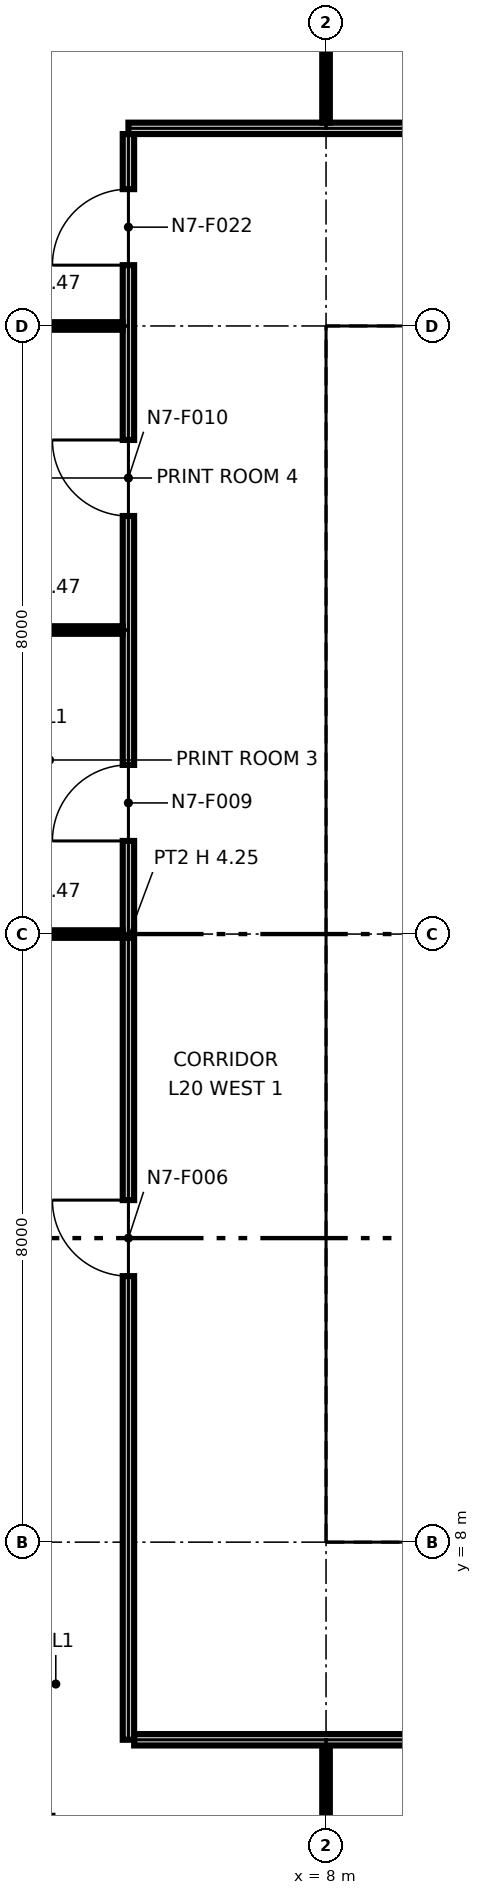
"""IFC4 building model, lengths in metres.
Left out: names, types, materials, properties, quantities, classifications, styles, units other than length and angle.
Written with IfcOpenShell. Run it as: python <this file> out.ifc"""

import sys

from ifc_helpers import new_model, si_unit, direction, frame, frame_2d, origin, origin_2d, place, context, subcontext, project, spatial, polyline, rectangle, i_section, outline, extrude, element, fill, save


model = new_model("IFC4")
c1 = context("Model", 3, precision=1e-05, world=origin(), true_north=direction((0.0, 1.0)))
c2 = subcontext(c1, "Body", "Model", "MODEL_VIEW")
j1 = project(units=[si_unit("LENGTHUNIT", "METRE"), si_unit("PLANEANGLEUNIT", "RADIAN")], contexts=[c1])
p1 = place(None, origin())
s1 = spatial("IfcSite", under=j1, at=p1, CompositionType="ELEMENT")
p2 = place(p1, origin())
s2 = spatial("IfcBuilding", under=s1, at=p2, CompositionType="ELEMENT")
p3 = place(p2, frame((0.0, 0.0, 105.2)))
s3 = spatial("IfcBuildingStorey", under=s2, at=p3, CompositionType="ELEMENT", Elevation=105.2)
for number, where, z_axis, x_axis in (
    (1, (8.0, 8.0, 0.0), (0.0, 0.0, 1.0), (1.0, 0.0, 0.0)),
    (2, (8.0, 16.0, 0.0), (0.0, 0.0, 1.0), (1.0, 0.0, 0.0)),
):
    element("IfcColumn", number, at=place(p3, frame(where, z_axis=z_axis, x_axis=x_axis)), inside=s3, PredefinedType="COLUMN", context=c2, shape_type="SweptSolid", body=[
        extrude(i_section(OverallWidth=0.406, OverallDepth=0.417, WebThickness=0.03, FlangeThickness=0.048, at=origin_2d()), origin(), (0.0, 0.0, 1.0), 4.25),
    ])
p4 = place(p3, frame((8.0, 24.0, 0.0), z_axis=(0.0, 0.0, 1.0), x_axis=(1.0, 0.0, 0.0)))
e3 = element("IfcColumn", 3, at=p4, inside=s3, PredefinedType="COLUMN", context=c2, shape_type="SweptSolid", body=[
    extrude(i_section(OverallWidth=0.411, OverallDepth=0.434, WebThickness=0.036, FlangeThickness=0.057, at=origin_2d()), origin(), (0.0, 0.0, 1.0), 4.25),
])
p5 = place(p3, frame((8.65, 8.75, 0.0), z_axis=(0.0, 0.0, 1.0), x_axis=(1.0, 0.0, 0.0)))
e4 = element("IfcWall", 4, at=p5, inside=s3, PredefinedType="PARTITIONING", context=c2, shape_type="SweptSolid", body=[
    extrude(outline(polyline([(0.0, 0.0), (14.7, 0.0), (14.7, 4.25), (7.469, 4.25), (7.469, 3.632), (7.231, 3.632), (7.23, 4.25), (0.0, 4.25), (0.0, 0.0)])), frame((0.0, 0.1, 0.0), z_axis=(0.0, -1.0, 0.0), x_axis=(1.0, 0.0, 0.0)), (0.0, 0.0, 1.0), 0.2),
])
p6 = place(p5, frame((1.3, 0.0, 0.0)))
e5 = element("IfcOpeningElement", 5, at=p6, cuts=e4, PredefinedType="OPENING", context=c2, shape_type="SweptSolid", body=[
    extrude(rectangle(XDim=1.4, YDim=2.1, at=frame_2d((0.7, 1.05))), frame((0.0, 0.11, 0.0), z_axis=(0.0, -1.0, 0.0), x_axis=(1.0, 0.0, 0.0)), (0.0, 0.0, 1.0), 0.22),
])
p7 = place(p5, frame((4.6, 0.0, 0.0)))
e6 = element("IfcOpeningElement", 6, at=p7, cuts=e4, PredefinedType="OPENING", context=c2, shape_type="SweptSolid", body=[
    extrude(rectangle(XDim=1.4, YDim=2.1, at=frame_2d((0.7, 1.05))), frame((0.0, 0.11, 0.0), z_axis=(0.0, -1.0, 0.0), x_axis=(1.0, 0.0, 0.0)), (0.0, 0.0, 1.0), 0.22),
])
p8 = place(p5, frame((10.4, 0.0, 0.0)))
e7 = element("IfcOpeningElement", 7, at=p8, cuts=e4, PredefinedType="OPENING", context=c2, shape_type="SweptSolid", body=[
    extrude(rectangle(XDim=1.2, YDim=2.1, at=frame_2d((0.6, 1.05))), frame((0.0, 0.11, 0.0), z_axis=(0.0, -1.0, 0.0), x_axis=(1.0, 0.0, 0.0)), (0.0, 0.0, 1.0), 0.22),
])
p9 = place(p3, frame((8.75, 8.85, 0.0), z_axis=(0.0, 0.0, 1.0), x_axis=(0.0, 1.0, 0.0)))
e8 = element("IfcWall", 8, at=p9, inside=s3, PredefinedType="PARTITIONING", context=c2, shape_type="SweptSolid", body=[
    extrude(outline(polyline([(0.0, 0.0), (14.3, 0.0), (14.3, 4.25), (10.231, 4.25), (10.23, 3.789), (10.07, 3.789), (10.069, 4.25), (7.27, 4.25), (7.269, 3.632), (7.031, 3.632), (7.031, 4.25), (0.0, 4.25), (0.0, 0.0)])), frame((0.0, 0.1, 0.0), z_axis=(0.0, -1.0, 0.0), x_axis=(1.0, 0.0, 0.0)), (0.0, 0.0, 1.0), 0.2),
])
p10 = place(p9, frame((8.3, 0.0, 0.0)))
e9 = element("IfcOpeningElement", 9, at=p10, cuts=e8, PredefinedType="OPENING", context=c2, shape_type="SweptSolid", body=[
    extrude(rectangle(XDim=1.8, YDim=2.1, at=frame_2d((0.9, 1.05))), frame((0.0, 0.11, 0.0), z_axis=(0.0, -1.0, 0.0), x_axis=(1.0, 0.0, 0.0)), (0.0, 0.0, 1.0), 0.22),
])
p11 = place(p3, frame((8.65, 23.25, 0.0), z_axis=(0.0, 0.0, 1.0), x_axis=(1.0, 0.0, 0.0)))
e10 = element("IfcWall", 10, at=p11, inside=s3, PredefinedType="PARTITIONING", context=c2, shape_type="SweptSolid", body=[
    extrude(outline(polyline([(0.0, 0.0), (14.7, 0.0), (14.7, 4.25), (7.469, 4.25), (7.469, 3.632), (7.231, 3.632), (7.23, 4.25), (0.0, 4.25), (0.0, 0.0)])), frame((0.0, 0.1, 0.0), z_axis=(0.0, -1.0, 0.0), x_axis=(1.0, 0.0, 0.0)), (0.0, 0.0, 1.0), 0.2),
])
p12 = place(p3, frame((8.85, 16.0, 0.0), z_axis=(0.0, 0.0, 1.0), x_axis=(1.0, 0.0, 0.0)))
e11 = element("IfcWall", 11, at=p12, inside=s3, PredefinedType="PARTITIONING", context=c2, shape_type="SweptSolid", body=[
    extrude(rectangle(XDim=6.931, YDim=0.6, at=frame_2d((3.466, 0.0))), origin(), (0.0, 0.0, 1.0), 3.632),
])
p13 = place(p3, frame((8.85, 19.9, 0.0), z_axis=(0.0, 0.0, 1.0), x_axis=(1.0, 0.0, 0.0)))
e12 = element("IfcWall", 12, at=p13, inside=s3, PredefinedType="PARTITIONING", context=c2, shape_type="SweptSolid", body=[
    extrude(outline(polyline([(0.0, 0.0), (14.3, 0.0), (14.3, 3.789), (7.27, 3.789), (7.269, 3.632), (7.031, 3.632), (7.031, 4.25), (0.0, 4.25), (0.0, 0.0)])), frame((0.0, 0.1, 0.0), z_axis=(0.0, -1.0, 0.0), x_axis=(1.0, 0.0, 0.0)), (0.0, 0.0, 1.0), 0.2),
])
p14 = place(p13, frame((6.9, 0.0, 0.0)))
e13 = element("IfcOpeningElement", 13, at=p14, cuts=e12, PredefinedType="OPENING", context=c2, shape_type="SweptSolid", body=[
    extrude(rectangle(XDim=0.9, YDim=2.1, at=frame_2d((0.45, 1.05))), frame((0.0, 0.11, 0.0), z_axis=(0.0, -1.0, 0.0), x_axis=(1.0, 0.0, 0.0)), (0.0, 0.0, 1.0), 0.22),
])
p15 = place(p13, frame((9.95, 0.0, 0.0)))
e14 = element("IfcOpeningElement", 14, at=p15, cuts=e12, PredefinedType="OPENING", context=c2, shape_type="SweptSolid", body=[
    extrude(rectangle(XDim=0.9, YDim=2.1, at=frame_2d((0.45, 1.05))), frame((0.0, 0.11, 0.0), z_axis=(0.0, -1.0, 0.0), x_axis=(1.0, 0.0, 0.0)), (0.0, 0.0, 1.0), 0.22),
])
p16 = place(p13, frame((12.45, 0.0, 0.0)))
e15 = element("IfcOpeningElement", 15, at=p16, cuts=e12, PredefinedType="OPENING", context=c2, shape_type="SweptSolid", body=[
    extrude(rectangle(XDim=0.9, YDim=2.1, at=frame_2d((0.45, 1.05))), frame((0.0, 0.11, 0.0), z_axis=(0.0, -1.0, 0.0), x_axis=(1.0, 0.0, 0.0)), (0.0, 0.0, 1.0), 0.22),
])
p17 = place(p3, frame((8.0, 2.83, 0.0), z_axis=(0.0, 0.0, 1.0), x_axis=(0.0, 1.0, 0.0)))
e16 = element("IfcWall", 16, at=p17, inside=s3, PredefinedType="PARTITIONING", context=c2, shape_type="SweptSolid", body=[
    extrude(rectangle(XDim=2.495, YDim=0.1, at=frame_2d((1.248, 0.0))), origin(), (0.0, 0.0, 1.0), 3.47),
])
p18 = place(p3, frame((5.475, 5.4, 0.0), z_axis=(0.0, 0.0, 1.0), x_axis=(1.0, 0.0, 0.0)))
e17 = element("IfcWall", 17, at=p18, inside=s3, PredefinedType="PARTITIONING", context=c2, shape_type="SweptSolid", body=[
    extrude(rectangle(XDim=21.05, YDim=0.15, at=frame_2d((10.525, 0.0))), origin(), (0.0, 0.0, 1.0), 4.25),
])
p19 = place(p18, frame((13.025, 0.0, 0.0), z_axis=(0.0, 0.0, 1.0), x_axis=(-1.0, 0.0, 0.0)))
e18 = element("IfcOpeningElement", 18, at=p19, cuts=e17, PredefinedType="OPENING", context=c2, shape_type="SweptSolid", body=[
    extrude(rectangle(XDim=1.0, YDim=2.1, at=frame_2d((0.5, 1.05))), frame((0.0, 0.085, 0.0), z_axis=(0.0, -1.0, 0.0), x_axis=(1.0, 0.0, 0.0)), (0.0, 0.0, 1.0), 0.17),
])
p20 = place(p18, frame((17.025, 0.0, 0.0), z_axis=(0.0, 0.0, 1.0), x_axis=(-1.0, 0.0, 0.0)))
e19 = element("IfcOpeningElement", 19, at=p20, cuts=e17, PredefinedType="OPENING", context=c2, shape_type="SweptSolid", body=[
    extrude(rectangle(XDim=1.0, YDim=2.1, at=frame_2d((0.5, 1.05))), frame((0.0, 0.085, 0.0), z_axis=(0.0, -1.0, 0.0), x_axis=(1.0, 0.0, 0.0)), (0.0, 0.0, 1.0), 0.17),
])
p21 = place(p18, frame((5.025, 0.0, 0.0), z_axis=(0.0, 0.0, 1.0), x_axis=(-1.0, 0.0, 0.0)))
e20 = element("IfcOpeningElement", 20, at=p21, cuts=e17, PredefinedType="OPENING", context=c2, shape_type="SweptSolid", body=[
    extrude(rectangle(XDim=1.0, YDim=2.1, at=frame_2d((0.5, 1.05))), frame((0.0, 0.085, 0.0), z_axis=(0.0, -1.0, 0.0), x_axis=(1.0, 0.0, 0.0)), (0.0, 0.0, 1.0), 0.17),
])
p22 = place(p18, frame((9.025, 0.0, 0.0), z_axis=(0.0, 0.0, 1.0), x_axis=(-1.0, 0.0, 0.0)))
e21 = element("IfcOpeningElement", 21, at=p22, cuts=e17, PredefinedType="OPENING", context=c2, shape_type="SweptSolid", body=[
    extrude(rectangle(XDim=1.0, YDim=2.1, at=frame_2d((0.5, 1.05))), frame((0.0, 0.085, 0.0), z_axis=(0.0, -1.0, 0.0), x_axis=(1.0, 0.0, 0.0)), (0.0, 0.0, 1.0), 0.17),
])
p23 = place(p18, frame((18.925, 0.0, 0.0)))
e22 = element("IfcOpeningElement", 22, at=p23, cuts=e17, PredefinedType="OPENING", context=c2, shape_type="SweptSolid", body=[
    extrude(rectangle(XDim=1.8, YDim=2.1, at=frame_2d((0.9, 1.05))), frame((0.0, 0.085, 0.0), z_axis=(0.0, -1.0, 0.0), x_axis=(1.0, 0.0, 0.0)), (0.0, 0.0, 1.0), 0.17),
])
p24 = place(p3, frame((5.4, 5.4, 0.0), z_axis=(0.0, 0.0, 1.0), x_axis=(0.0, 1.0, 0.0)))
e23 = element("IfcWall", 23, at=p24, inside=s3, PredefinedType="PARTITIONING", context=c2, shape_type="SweptSolid", body=[
    extrude(outline(polyline([(0.0, 0.0), (21.125, 0.0), (21.125, 4.25), (18.9, 4.25), (18.898, 3.47), (18.302, 3.47), (18.3, 4.25), (14.9, 4.25), (14.898, 3.47), (14.302, 3.47), (14.3, 4.25), (10.9, 4.25), (10.898, 3.47), (10.302, 3.47), (10.3, 4.25), (6.9, 4.25), (6.898, 3.47), (6.302, 3.47), (6.3, 4.25), (2.9, 4.25), (2.898, 3.47), (2.302, 3.47), (2.3, 4.25), (0.0, 4.25), (0.0, 0.0)])), frame((0.0, 0.075, 0.0), z_axis=(0.0, -1.0, 0.0), x_axis=(1.0, 0.0, 0.0)), (0.0, 0.0, 1.0), 0.15),
])
p25 = place(p24, frame((6.1, 0.0, 0.0)))
e24 = element("IfcOpeningElement", 24, at=p25, cuts=e23, PredefinedType="OPENING", context=c2, shape_type="SweptSolid", body=[
    extrude(rectangle(XDim=1.0, YDim=2.1, at=frame_2d((0.5, 1.05))), frame((0.0, 0.085, 0.0), z_axis=(0.0, -1.0, 0.0), x_axis=(1.0, 0.0, 0.0)), (0.0, 0.0, 1.0), 0.17),
])
p26 = place(p24, frame((11.825, 0.0, 0.0)))
e25 = element("IfcOpeningElement", 25, at=p26, cuts=e23, PredefinedType="OPENING", context=c2, shape_type="SweptSolid", body=[
    extrude(rectangle(XDim=1.0, YDim=2.1, at=frame_2d((0.5, 1.05))), frame((0.0, 0.085, 0.0), z_axis=(0.0, -1.0, 0.0), x_axis=(1.0, 0.0, 0.0)), (0.0, 0.0, 1.0), 0.17),
])
p27 = place(p24, frame((16.1, 0.0, 0.0)))
e26 = element("IfcOpeningElement", 26, at=p27, cuts=e23, PredefinedType="OPENING", context=c2, shape_type="SweptSolid", body=[
    extrude(rectangle(XDim=1.0, YDim=2.1, at=frame_2d((0.5, 1.05))), frame((0.0, 0.085, 0.0), z_axis=(0.0, -1.0, 0.0), x_axis=(1.0, 0.0, 0.0)), (0.0, 0.0, 1.0), 0.17),
])
p28 = place(p24, frame((19.4, 0.0, 0.0)))
e27 = element("IfcOpeningElement", 27, at=p28, cuts=e23, PredefinedType="OPENING", context=c2, shape_type="SweptSolid", body=[
    extrude(rectangle(XDim=1.0, YDim=2.1, at=frame_2d((0.5, 1.05))), frame((0.0, 0.085, 0.0), z_axis=(0.0, -1.0, 0.0), x_axis=(1.0, 0.0, 0.0)), (0.0, 0.0, 1.0), 0.17),
])
for number, where, z_axis, x_axis in (
    (28, (2.83, 16.0, 0.0), (0.0, 0.0, 1.0), (1.0, 0.0, 0.0)),
    (29, (2.83, 20.0, 0.0), (0.0, 0.0, 1.0), (1.0, 0.0, 0.0)),
    (30, (2.83, 24.0, 0.0), (0.0, 0.0, 1.0), (1.0, 0.0, 0.0)),
):
    element("IfcWall", number, at=place(p3, frame(where, z_axis=z_axis, x_axis=x_axis)), inside=s3, PredefinedType="PARTITIONING", context=c2, shape_type="SweptSolid", body=[
        extrude(rectangle(XDim=2.495, YDim=0.1, at=frame_2d((1.248, 0.0))), origin(), (0.0, 0.0, 1.0), 3.47),
    ])
p29 = place(p3, frame((5.4, 26.6, 0.0), z_axis=(0.0, 0.0, 1.0), x_axis=(1.0, 0.0, 0.0)))
e31 = element("IfcWall", 31, at=p29, inside=s3, PredefinedType="PARTITIONING", context=c2, shape_type="SweptSolid", body=[
    extrude(rectangle(XDim=18.525, YDim=0.15, at=frame_2d((9.263, 0.0))), origin(), (0.0, 0.0, 1.0), 4.25),
])
p30 = place(p29, frame((6.1, 0.0, 0.0)))
e32 = element("IfcOpeningElement", 32, at=p30, cuts=e31, PredefinedType="OPENING", context=c2, shape_type="SweptSolid", body=[
    extrude(rectangle(XDim=1.0, YDim=2.1, at=frame_2d((0.5, 1.05))), frame((0.0, 0.085, 0.0), z_axis=(0.0, -1.0, 0.0), x_axis=(1.0, 0.0, 0.0)), (0.0, 0.0, 1.0), 0.17),
])
p31 = place(p3, frame((8.0, 26.675, 0.0), z_axis=(0.0, 0.0, 1.0), x_axis=(0.0, 1.0, 0.0)))
e33 = element("IfcWall", 33, at=p31, inside=s3, PredefinedType="PARTITIONING", context=c2, shape_type="SweptSolid", body=[
    extrude(rectangle(XDim=5.295, YDim=0.1, at=frame_2d((2.647, 0.0))), origin(), (0.0, 0.0, 1.0), 3.47),
])
p32 = place(p10, origin())
e34 = element("IfcDoor", 34, at=p32, inside=s3, OperationType="DOUBLE_DOOR_SINGLE_SWING", PredefinedType="NOTDEFINED", context=c2, shape_type="SweptSolid", body=[
    extrude(rectangle(XDim=1.8, YDim=2.1, at=frame_2d((0.9, 1.05))), frame((0.0, 0.025, 0.0), z_axis=(0.0, -1.0, 0.0), x_axis=(1.0, 0.0, 0.0)), (0.0, 0.0, 1.0), 0.05),
])
fill(e9, e34)
p33 = place(p25, origin())
e35 = element("IfcDoor", 35, at=p33, inside=s3, OperationType="SINGLE_SWING_RIGHT", PredefinedType="DOOR", context=c2, shape_type="SweptSolid", body=[
    extrude(rectangle(XDim=1.0, YDim=2.1, at=frame_2d((0.5, 1.05))), frame((0.0, 0.025, 0.0), z_axis=(0.0, -1.0, 0.0), x_axis=(1.0, 0.0, 0.0)), (0.0, 0.0, 1.0), 0.05),
])
fill(e24, e35)
p34 = place(p26, origin())
e36 = element("IfcDoor", 36, at=p34, inside=s3, OperationType="SINGLE_SWING_LEFT", PredefinedType="DOOR", context=c2, shape_type="SweptSolid", body=[
    extrude(rectangle(XDim=1.0, YDim=2.1, at=frame_2d((0.5, 1.05))), frame((0.0, 0.025, 0.0), z_axis=(0.0, -1.0, 0.0), x_axis=(1.0, 0.0, 0.0)), (0.0, 0.0, 1.0), 0.05),
])
fill(e25, e36)
p35 = place(p27, origin())
e37 = element("IfcDoor", 37, at=p35, inside=s3, OperationType="SINGLE_SWING_RIGHT", PredefinedType="DOOR", context=c2, shape_type="SweptSolid", body=[
    extrude(rectangle(XDim=1.0, YDim=2.1, at=frame_2d((0.5, 1.05))), frame((0.0, 0.025, 0.0), z_axis=(0.0, -1.0, 0.0), x_axis=(1.0, 0.0, 0.0)), (0.0, 0.0, 1.0), 0.05),
])
fill(e26, e37)
p36 = place(p28, origin())
e38 = element("IfcDoor", 38, at=p36, inside=s3, OperationType="SINGLE_SWING_LEFT", PredefinedType="DOOR", context=c2, shape_type="SweptSolid", body=[
    extrude(rectangle(XDim=1.0, YDim=2.1, at=frame_2d((0.5, 1.05))), frame((0.0, 0.025, 0.0), z_axis=(0.0, -1.0, 0.0), x_axis=(1.0, 0.0, 0.0)), (0.0, 0.0, 1.0), 0.05),
])
fill(e27, e38)
save(model, sys.argv[1])
